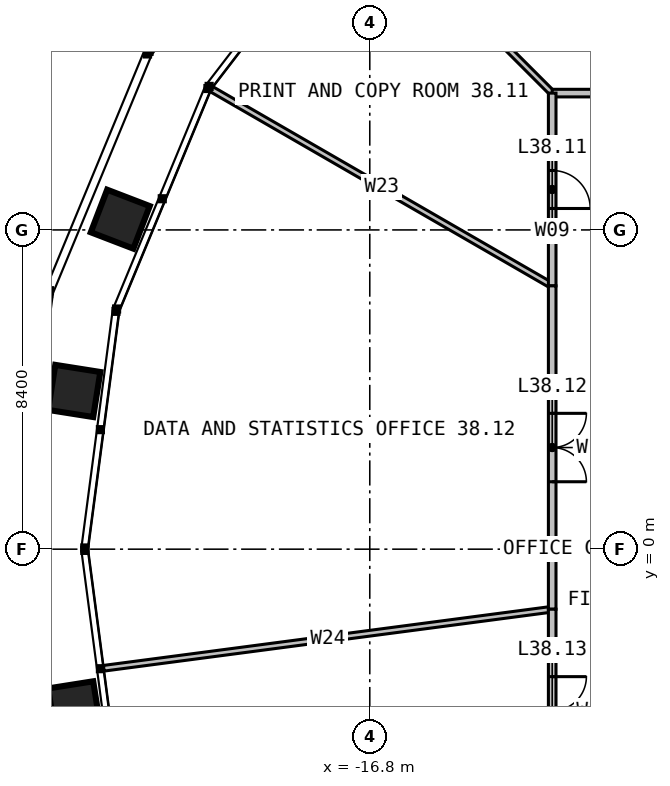
"""IFC4 building model, lengths in metres.
Left out: names, types, materials, properties, quantities, classifications, styles, units other than length and angle.
Written with IfcOpenShell. Run it as: python <this file> out.ifc"""

import sys

from ifc_helpers import new_model, si_unit, direction, frame, frame_2d, origin, place, context, subcontext, project, spatial, rectangle, extrude, element, fill, save


model = new_model("IFC4")
c1 = context("Model", 3, precision=1e-05, world=origin(), true_north=direction((0.0, 1.0)))
c2 = subcontext(c1, "Body", "Model", "MODEL_VIEW")
j1 = project(units=[si_unit("LENGTHUNIT", "METRE"), si_unit("PLANEANGLEUNIT", "RADIAN")], contexts=[c1])
p1 = place(None, origin())
s1 = spatial("IfcSite", under=j1, at=p1, CompositionType="ELEMENT")
p2 = place(p1, origin())
s2 = spatial("IfcBuilding", under=s1, at=p2, CompositionType="ELEMENT")
p3 = place(p2, frame((0.0, 0.0, 159.0)))
s3 = spatial("IfcBuildingStorey", under=s2, at=p3, CompositionType="ELEMENT", Elevation=159.0)
p4 = place(p3, frame((-6.928, 12.0, 0.0), z_axis=(0.0, 0.0, 1.0), x_axis=(-0.500006140648, 0.86602185845, 0.0)))
e1 = element("IfcWall", 1, at=p4, inside=s3, PredefinedType="PARTITIONING", context=c2, shape_type="SweptSolid", body=[
    extrude(rectangle(XDim=10.355, YDim=0.15, at=frame_2d((5.177, 0.0))), origin(), (0.0, 0.0, 1.0), 2.79),
])
p5 = place(p3, frame((-12.0, 12.0, 0.0), z_axis=(0.0, 0.0, 1.0), x_axis=(-0.707106781187, 0.707106781187, 0.0)))
e2 = element("IfcWall", 2, at=p5, inside=s3, PredefinedType="PARTITIONING", context=c2, shape_type="SweptSolid", body=[
    extrude(rectangle(XDim=7.24, YDim=0.15, at=frame_2d((3.62, 0.0))), origin(), (0.0, 0.0, 1.0), 2.79),
])
p6 = place(p3, frame((-12.0, 6.928, 0.0), z_axis=(0.0, 0.0, 1.0), x_axis=(-0.86602185845, 0.500006140648, 0.0)))
e3 = element("IfcWall", 3, at=p6, inside=s3, PredefinedType="PARTITIONING", context=c2, shape_type="SweptSolid", body=[
    extrude(rectangle(XDim=10.355, YDim=0.15, at=frame_2d((5.177, 0.0))), origin(), (0.0, 0.0, 1.0), 2.79),
])
p7 = place(p3, frame((-12.0, -1.58, 0.0), z_axis=(0.0, 0.0, 1.0), x_axis=(-0.99144619379, -0.130516071116, 0.0)))
e4 = element("IfcWall", 4, at=p7, inside=s3, PredefinedType="PARTITIONING", context=c2, shape_type="SweptSolid", body=[
    extrude(rectangle(XDim=11.901, YDim=0.15, at=frame_2d((5.95, 0.0))), origin(), (0.0, 0.0, 1.0), 2.79),
])
p8 = place(p3, frame((-6.928, 12.0, 0.0), z_axis=(0.0, 0.0, 1.0), x_axis=(-1.0, 0.0, 0.0)))
e5 = element("IfcWall", 5, at=p8, inside=s3, PredefinedType="PARTITIONING", context=c2, shape_type="SweptSolid", body=[
    extrude(rectangle(XDim=5.072, YDim=0.2, at=frame_2d((2.536, 0.0))), origin(), (0.0, 0.0, 1.0), 3.8),
])
p9 = place(p8, frame((2.036, 0.0, 0.0)))
e6 = element("IfcOpeningElement", 6, at=p9, cuts=e5, PredefinedType="OPENING", context=c2, shape_type="SweptSolid", body=[
    extrude(rectangle(XDim=1.0, YDim=2.2, at=frame_2d((0.5, 1.1))), frame((0.0, 0.11, 0.0), z_axis=(0.0, -1.0, 0.0), x_axis=(1.0, 0.0, 0.0)), (0.0, 0.0, 1.0), 0.22),
])
p10 = place(p3, frame((-12.0, 12.0, 0.0), z_axis=(0.0, 0.0, 1.0), x_axis=(0.0, -1.0, 0.0)))
e7 = element("IfcWall", 7, at=p10, inside=s3, PredefinedType="PARTITIONING", context=c2, shape_type="SweptSolid", body=[
    extrude(rectangle(XDim=5.072, YDim=0.2, at=frame_2d((2.536, 0.0))), origin(), (0.0, 0.0, 1.0), 3.8),
])
p11 = place(p10, frame((2.036, 0.0, 0.0)))
e8 = element("IfcOpeningElement", 8, at=p11, cuts=e7, PredefinedType="OPENING", context=c2, shape_type="SweptSolid", body=[
    extrude(rectangle(XDim=1.0, YDim=2.2, at=frame_2d((0.5, 1.1))), frame((0.0, 0.11, 0.0), z_axis=(0.0, -1.0, 0.0), x_axis=(1.0, 0.0, 0.0)), (0.0, 0.0, 1.0), 0.22),
])
p12 = place(p3, frame((-12.0, 6.928, 0.0), z_axis=(0.0, 0.0, 1.0), x_axis=(0.0, -1.0, 0.0)))
e9 = element("IfcWall", 9, at=p12, inside=s3, PredefinedType="PARTITIONING", context=c2, shape_type="SweptSolid", body=[
    extrude(rectangle(XDim=8.508, YDim=0.2, at=frame_2d((4.254, 0.0))), origin(), (0.0, 0.0, 1.0), 3.8),
])
p13 = place(p12, frame((3.354, 0.0, 0.0)))
e10 = element("IfcOpeningElement", 10, at=p13, cuts=e9, PredefinedType="OPENING", context=c2, shape_type="SweptSolid", body=[
    extrude(rectangle(XDim=1.8, YDim=2.2, at=frame_2d((0.9, 1.1))), frame((0.0, 0.11, 0.0), z_axis=(0.0, -1.0, 0.0), x_axis=(1.0, 0.0, 0.0)), (0.0, 0.0, 1.0), 0.22),
])
p14 = place(p3, frame((-12.0, -1.58, 0.0), z_axis=(0.0, 0.0, 1.0), x_axis=(0.0, -1.0, 0.0)))
e11 = element("IfcWall", 11, at=p14, inside=s3, PredefinedType="PARTITIONING", context=c2, shape_type="SweptSolid", body=[
    extrude(rectangle(XDim=5.348, YDim=0.2, at=frame_2d((2.674, 0.0))), origin(), (0.0, 0.0, 1.0), 3.8),
])
p15 = place(p14, frame((1.774, 0.0, 0.0)))
e12 = element("IfcOpeningElement", 12, at=p15, cuts=e11, PredefinedType="OPENING", context=c2, shape_type="SweptSolid", body=[
    extrude(rectangle(XDim=1.8, YDim=2.2, at=frame_2d((0.9, 1.1))), frame((0.0, 0.11, 0.0), z_axis=(0.0, -1.0, 0.0), x_axis=(1.0, 0.0, 0.0)), (0.0, 0.0, 1.0), 0.22),
])
p16 = place(p11, origin())
e13 = element("IfcDoor", 13, at=p16, inside=s3, OperationType="SINGLE_SWING_RIGHT", PredefinedType="DOOR", context=c2, shape_type="SweptSolid", body=[
    extrude(rectangle(XDim=1.0, YDim=2.2, at=frame_2d((0.5, 1.1))), frame((0.0, 0.025, 0.0), z_axis=(0.0, -1.0, 0.0), x_axis=(1.0, 0.0, 0.0)), (0.0, 0.0, 1.0), 0.05),
])
fill(e8, e13)
p17 = place(p13, origin())
e14 = element("IfcDoor", 14, at=p17, inside=s3, OperationType="DOUBLE_DOOR_SINGLE_SWING", PredefinedType="DOOR", context=c2, shape_type="SweptSolid", body=[
    extrude(rectangle(XDim=1.8, YDim=2.2, at=frame_2d((0.9, 1.1))), frame((0.0, 0.025, 0.0), z_axis=(0.0, -1.0, 0.0), x_axis=(1.0, 0.0, 0.0)), (0.0, 0.0, 1.0), 0.05),
])
fill(e10, e14)
p18 = place(p15, origin())
e15 = element("IfcDoor", 15, at=p18, inside=s3, OperationType="DOUBLE_DOOR_SINGLE_SWING", PredefinedType="DOOR", context=c2, shape_type="SweptSolid", body=[
    extrude(rectangle(XDim=1.8, YDim=2.2, at=frame_2d((0.9, 1.1))), frame((0.0, 0.025, 0.0), z_axis=(0.0, -1.0, 0.0), x_axis=(1.0, 0.0, 0.0)), (0.0, 0.0, 1.0), 0.05),
])
fill(e12, e15)
save(model, sys.argv[1])
